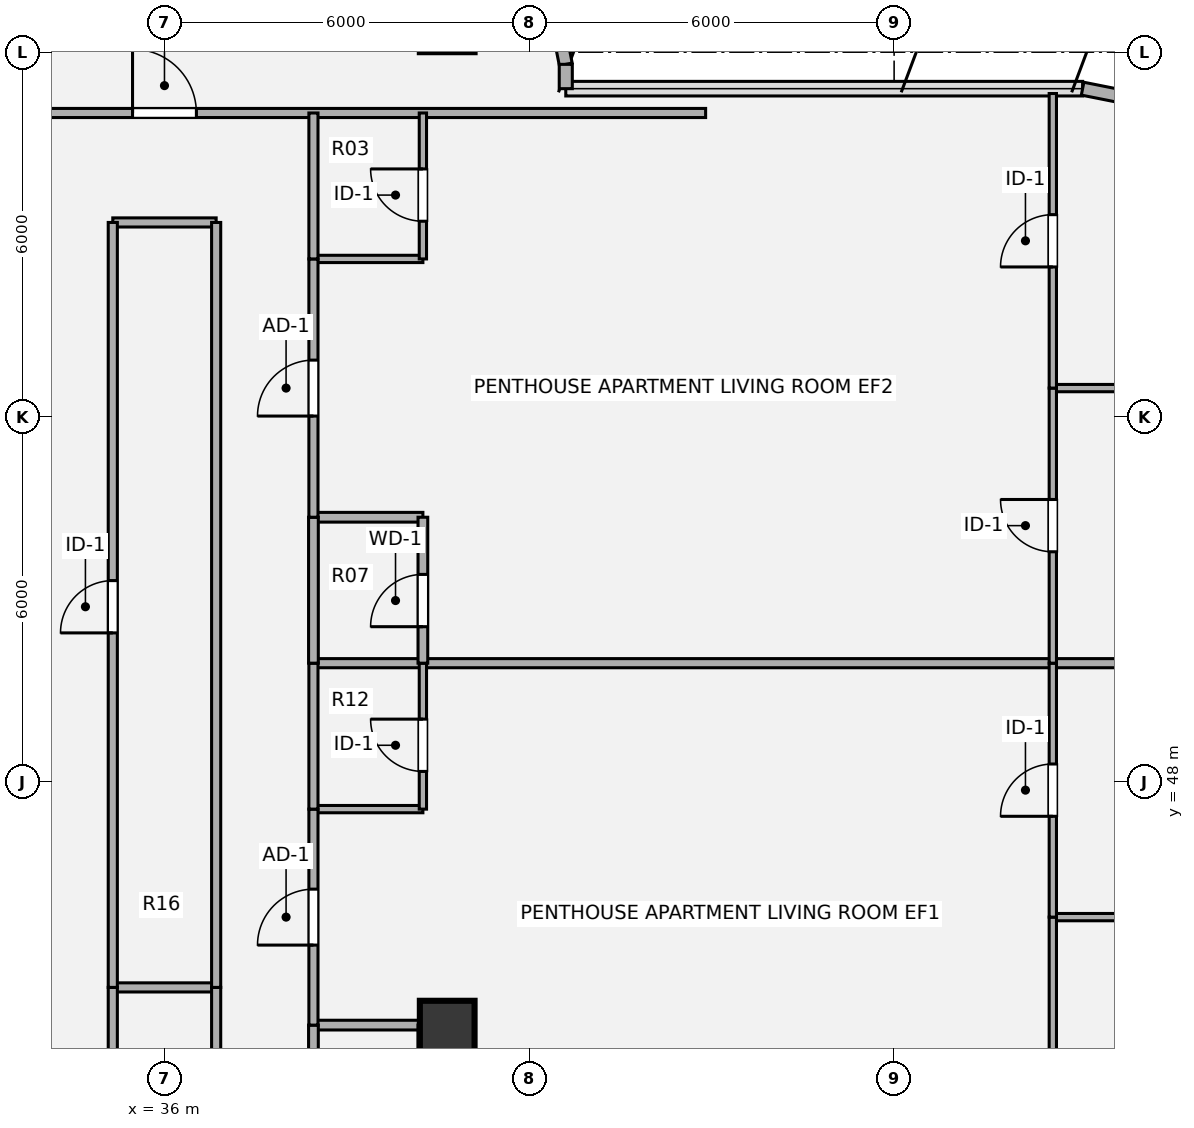
"""IFC4 building model, lengths in metres.
Left out: names, types, materials, properties, quantities, classifications, styles, units other than length and angle.
Written with IfcOpenShell. Run it as: python <this file> out.ifc"""

import sys

from ifc_helpers import new_model, si_unit, direction, frame, frame_2d, origin, origin_2d, place, context, subcontext, project, spatial, rectangle, hollow_circle, extrude, source, transform, mapped, element, fill, save


model = new_model("IFC4")
c1 = context("Model", 3, precision=1e-05, world=origin(), true_north=direction((0.0, 1.0)))
c2 = subcontext(c1, "Body", "Model", "MODEL_VIEW")
j1 = project(units=[si_unit("LENGTHUNIT", "METRE"), si_unit("PLANEANGLEUNIT", "RADIAN")], contexts=[c1])
p1 = place(None, origin())
s1 = spatial("IfcSite", under=j1, at=p1, CompositionType="ELEMENT")
p2 = place(p1, origin())
s2 = spatial("IfcBuilding", under=s1, at=p2, CompositionType="ELEMENT")
p3 = place(p2, frame((0.0, 0.0, 223.02)))
s3 = spatial("IfcBuildingStorey", under=s2, at=p3, CompositionType="ELEMENT", Elevation=223.02)
m1 = source(origin(), c2, "Body", "SweptSolid", [
    extrude(hollow_circle(Radius=0.45, WallThickness=0.032, at=origin_2d()), origin(), (0.0, 0.0, 1.0), 3.78),
])
p4 = place(p3, frame((40.65, 43.95, 0.0), z_axis=(0.0, 0.0, 1.0), x_axis=(1.0, 0.0, 0.0)))
e1 = element("IfcColumn", 1, at=p4, inside=s3, PredefinedType="COLUMN", context=c2, shape_type="MappedRepresentation", body=[
    mapped(m1, transform((0.0, 0.0, 0.0), x_axis=(1.0, 0.0, 0.0), y_axis=(0.0, 1.0, 0.0), z_axis=(0.0, 0.0, 1.0), scale=1.0)),
])
p5 = place(p3, frame((42.402, 60.795, 0.0), z_axis=(0.0, 0.0, 1.0), x_axis=(0.195190360752, -0.980765376158, 0.0)))
e2 = element("IfcWall", 2, at=p5, inside=s3, PredefinedType="SOLIDWALL", context=c2, shape_type="SweptSolid", body=[
    extrude(rectangle(XDim=1.014, YDim=0.215, at=frame_2d((0.507, 0.0))), origin(), (0.0, 0.0, 1.0), 3.53),
])
p6 = place(p3, frame((42.6, 59.8, 0.0), z_axis=(0.0, 0.0, 1.0), x_axis=(0.0, -1.0, 0.0)))
e3 = element("IfcWall", 3, at=p6, inside=s3, PredefinedType="SOLIDWALL", context=c2, shape_type="SweptSolid", body=[
    extrude(rectangle(XDim=0.4, YDim=0.215, at=frame_2d((0.2, 0.0))), origin(), (0.0, 0.0, 1.0), 3.53),
])
p7 = place(p3, frame((51.1, 59.4, 0.0), z_axis=(0.0, 0.0, 1.0), x_axis=(0.980813122964, -0.194950295773, 0.0)))
e4 = element("IfcWall", 4, at=p7, inside=s3, PredefinedType="SOLIDWALL", context=c2, shape_type="SweptSolid", body=[
    extrude(rectangle(XDim=1.249, YDim=0.215, at=frame_2d((0.624, 0.0))), origin(), (0.0, 0.0, 1.0), 3.53),
])
p8 = place(p3, frame((38.45, 44.0, 0.0), z_axis=(0.0, 0.0, 1.0), x_axis=(1.0, 0.0, 0.0)))
e5 = element("IfcWall", 5, at=p8, inside=s3, PredefinedType="PLUMBINGWALL", context=c2, shape_type="SweptSolid", body=[
    extrude(rectangle(XDim=1.8, YDim=0.16, at=frame_2d((0.9, 0.0))), origin(), (0.0, 0.0, 1.0), 2.903),
])
p9 = place(p3, frame((35.15, 44.62, 0.0), z_axis=(0.0, 0.0, 1.0), x_axis=(1.0, 0.0, 0.0)))
e6 = element("IfcWall", 6, at=p9, inside=s3, PredefinedType="PARTITIONING", context=c2, shape_type="SweptSolid", body=[
    extrude(rectangle(XDim=1.7, YDim=0.15, at=frame_2d((0.85, 0.0))), origin(), (0.0, 0.0, 1.0), 3.259),
])
p10 = place(p3, frame((50.61, 45.776, 0.0), z_axis=(0.0, 0.0, 1.0), x_axis=(1.0, 0.0, 0.0)))
e7 = element("IfcWall", 7, at=p10, inside=s3, PredefinedType="PARTITIONING", context=c2, shape_type="SweptSolid", body=[
    extrude(rectangle(XDim=3.61, YDim=0.12, at=frame_2d((1.805, 0.0))), origin(), (0.0, 0.0, 1.0), 2.982),
])
p11 = place(p3, frame((38.45, 47.552, 0.0), z_axis=(0.0, 0.0, 1.0), x_axis=(1.0, 0.0, 0.0)))
e8 = element("IfcWall", 8, at=p11, inside=s3, PredefinedType="PARTITIONING", context=c2, shape_type="SweptSolid", body=[
    extrude(rectangle(XDim=1.8, YDim=0.12, at=frame_2d((0.9, 0.0))), origin(), (0.0, 0.0, 1.0), 3.259),
])
p12 = place(p3, frame((38.45, 49.952, 0.0), z_axis=(0.0, 0.0, 1.0), x_axis=(1.0, 0.0, 0.0)))
e9 = element("IfcWall", 9, at=p12, inside=s3, PredefinedType="PARTITIONING", context=c2, shape_type="SweptSolid", body=[
    extrude(rectangle(XDim=15.77, YDim=0.15, at=frame_2d((7.885, 0.0))), origin(), (0.0, 0.0, 1.0), 2.982),
])
p13 = place(p3, frame((38.45, 52.352, 0.0), z_axis=(0.0, 0.0, 1.0), x_axis=(1.0, 0.0, 0.0)))
e10 = element("IfcWall", 10, at=p13, inside=s3, PredefinedType="PLUMBINGWALL", context=c2, shape_type="SweptSolid", body=[
    extrude(rectangle(XDim=1.8, YDim=0.16, at=frame_2d((0.9, 0.0))), origin(), (0.0, 0.0, 1.0), 3.259),
])
p14 = place(p3, frame((50.61, 54.476, 0.0), z_axis=(0.0, 0.0, 1.0), x_axis=(1.0, 0.0, 0.0)))
e11 = element("IfcWall", 11, at=p14, inside=s3, PredefinedType="PARTITIONING", context=c2, shape_type="SweptSolid", body=[
    extrude(rectangle(XDim=3.61, YDim=0.12, at=frame_2d((1.805, 0.0))), origin(), (0.0, 0.0, 1.0), 2.903),
])
p15 = place(p3, frame((38.45, 56.6, 0.0), z_axis=(0.0, 0.0, 1.0), x_axis=(1.0, 0.0, 0.0)))
e12 = element("IfcWall", 12, at=p15, inside=s3, PredefinedType="PARTITIONING", context=c2, shape_type="SweptSolid", body=[
    extrude(rectangle(XDim=1.8, YDim=0.12, at=frame_2d((0.9, 0.0))), origin(), (0.0, 0.0, 1.0), 3.259),
])
p16 = place(p3, frame((35.15, 57.2, 0.0), z_axis=(0.0, 0.0, 1.0), x_axis=(1.0, 0.0, 0.0)))
e13 = element("IfcWall", 13, at=p16, inside=s3, PredefinedType="PARTITIONING", context=c2, shape_type="SweptSolid", body=[
    extrude(rectangle(XDim=1.7, YDim=0.15, at=frame_2d((0.85, 0.0))), origin(), (0.0, 0.0, 1.0), 3.308),
])
p17 = place(p3, frame((27.1, 59.0, 0.0), z_axis=(0.0, 0.0, 1.0), x_axis=(1.0, 0.0, 0.0)))
e14 = element("IfcWall", 14, at=p17, inside=s3, PredefinedType="PARTITIONING", context=c2, shape_type="SweptSolid", body=[
    extrude(rectangle(XDim=17.8, YDim=0.15, at=frame_2d((8.9, 0.0))), origin(), (0.0, 0.0, 1.0), 3.308),
])
p18 = place(p17, frame((8.375, 0.0, 0.0)))
e15 = element("IfcOpeningElement", 15, at=p18, cuts=e14, PredefinedType="OPENING", context=c2, shape_type="SweptSolid", body=[
    extrude(rectangle(XDim=1.05, YDim=2.1, at=origin_2d()), frame((0.525, 0.085, 1.05), z_axis=(0.0, -1.0, 0.0), x_axis=(1.0, 0.0, 0.0)), (0.0, 0.0, 1.0), 0.17),
])
p19 = place(p3, frame((35.15, 25.2, 0.0), z_axis=(0.0, 0.0, 1.0), x_axis=(0.0, 1.0, 0.0)))
e16 = element("IfcWall", 16, at=p19, inside=s3, PredefinedType="PARTITIONING", context=c2, shape_type="SweptSolid", body=[
    extrude(rectangle(XDim=19.42, YDim=0.15, at=frame_2d((9.71, 0.0))), origin(), (0.0, 0.0, 1.0), 3.5),
])
p20 = place(p3, frame((35.15, 44.62, 0.0), z_axis=(0.0, 0.0, 1.0), x_axis=(0.0, 1.0, 0.0)))
e17 = element("IfcWall", 17, at=p20, inside=s3, PredefinedType="PARTITIONING", context=c2, shape_type="SweptSolid", body=[
    extrude(rectangle(XDim=12.58, YDim=0.15, at=frame_2d((6.29, 0.0))), origin(), (0.0, 0.0, 1.0), 3.5),
])
p21 = place(p20, frame((5.83, 0.0, 0.0)))
e18 = element("IfcOpeningElement", 18, at=p21, cuts=e17, PredefinedType="OPENING", context=c2, shape_type="SweptSolid", body=[
    extrude(rectangle(XDim=0.86, YDim=2.1, at=origin_2d()), frame((0.43, 0.085, 1.05), z_axis=(0.0, -1.0, 0.0), x_axis=(1.0, 0.0, 0.0)), (0.0, 0.0, 1.0), 0.17),
])
p22 = place(p3, frame((36.85, 25.2, 0.0), z_axis=(0.0, 0.0, 1.0), x_axis=(0.0, 1.0, 0.0)))
e19 = element("IfcWall", 19, at=p22, inside=s3, PredefinedType="PARTITIONING", context=c2, shape_type="SweptSolid", body=[
    extrude(rectangle(XDim=19.42, YDim=0.15, at=frame_2d((9.71, 0.0))), origin(), (0.0, 0.0, 1.0), 3.5),
])
p23 = place(p22, frame((9.185, 0.0, 0.0)))
e20 = element("IfcOpeningElement", 20, at=p23, cuts=e19, PredefinedType="OPENING", context=c2, shape_type="SweptSolid", body=[
    extrude(rectangle(XDim=1.05, YDim=2.1, at=origin_2d()), frame((0.525, 0.085, 1.05), z_axis=(0.0, -1.0, 0.0), x_axis=(1.0, 0.0, 0.0)), (0.0, 0.0, 1.0), 0.17),
])
p24 = place(p3, frame((36.85, 44.62, 0.0), z_axis=(0.0, 0.0, 1.0), x_axis=(0.0, 1.0, 0.0)))
e21 = element("IfcWall", 21, at=p24, inside=s3, PredefinedType="PARTITIONING", context=c2, shape_type="SweptSolid", body=[
    extrude(rectangle(XDim=12.58, YDim=0.15, at=frame_2d((6.29, 0.0))), origin(), (0.0, 0.0, 1.0), 3.5),
])
p25 = place(p3, frame((38.45, 41.6, 0.0), z_axis=(0.0, 0.0, 1.0), x_axis=(0.0, 1.0, 0.0)))
e22 = element("IfcWall", 22, at=p25, inside=s3, PredefinedType="PLUMBINGWALL", context=c2, shape_type="SweptSolid", body=[
    extrude(rectangle(XDim=2.4, YDim=0.16, at=frame_2d((1.2, 0.0))), origin(), (0.0, 0.0, 1.0), 3.5),
])
p26 = place(p3, frame((38.45, 44.0, 0.0), z_axis=(0.0, 0.0, 1.0), x_axis=(0.0, 1.0, 0.0)))
e23 = element("IfcWall", 23, at=p26, inside=s3, PredefinedType="PARTITIONING", context=c2, shape_type="SweptSolid", body=[
    extrude(rectangle(XDim=3.552, YDim=0.15, at=frame_2d((1.776, 0.0))), origin(), (0.0, 0.0, 1.0), 3.5),
])
p27 = place(p26, frame((1.316, 0.0, 0.0)))
e24 = element("IfcOpeningElement", 24, at=p27, cuts=e23, PredefinedType="OPENING", context=c2, shape_type="SweptSolid", body=[
    extrude(rectangle(XDim=0.92, YDim=2.1, at=origin_2d()), frame((0.46, 0.085, 1.05), z_axis=(0.0, -1.0, 0.0), x_axis=(1.0, 0.0, 0.0)), (0.0, 0.0, 1.0), 0.17),
])
p28 = place(p3, frame((38.45, 47.552, 0.0), z_axis=(0.0, 0.0, 1.0), x_axis=(0.0, 1.0, 0.0)))
e25 = element("IfcWall", 25, at=p28, inside=s3, PredefinedType="PARTITIONING", context=c2, shape_type="SweptSolid", body=[
    extrude(rectangle(XDim=2.4, YDim=0.15, at=frame_2d((1.2, 0.0))), origin(), (0.0, 0.0, 1.0), 3.5),
])
p29 = place(p3, frame((38.45, 49.952, 0.0), z_axis=(0.0, 0.0, 1.0), x_axis=(0.0, 1.0, 0.0)))
e26 = element("IfcWall", 26, at=p29, inside=s3, PredefinedType="PLUMBINGWALL", context=c2, shape_type="SweptSolid", body=[
    extrude(rectangle(XDim=2.4, YDim=0.16, at=frame_2d((1.2, 0.0))), origin(), (0.0, 0.0, 1.0), 3.5),
])
p30 = place(p3, frame((38.45, 52.352, 0.0), z_axis=(0.0, 0.0, 1.0), x_axis=(0.0, 1.0, 0.0)))
e27 = element("IfcWall", 27, at=p30, inside=s3, PredefinedType="PARTITIONING", context=c2, shape_type="SweptSolid", body=[
    extrude(rectangle(XDim=4.248, YDim=0.15, at=frame_2d((2.124, 0.0))), origin(), (0.0, 0.0, 1.0), 3.5),
])
p31 = place(p30, frame((1.664, 0.0, 0.0)))
e28 = element("IfcOpeningElement", 28, at=p31, cuts=e27, PredefinedType="OPENING", context=c2, shape_type="SweptSolid", body=[
    extrude(rectangle(XDim=0.92, YDim=2.1, at=origin_2d()), frame((0.46, 0.085, 1.05), z_axis=(0.0, -1.0, 0.0), x_axis=(1.0, 0.0, 0.0)), (0.0, 0.0, 1.0), 0.17),
])
p32 = place(p3, frame((38.45, 56.6, 0.0), z_axis=(0.0, 0.0, 1.0), x_axis=(0.0, 1.0, 0.0)))
e29 = element("IfcWall", 29, at=p32, inside=s3, PredefinedType="PARTITIONING", context=c2, shape_type="SweptSolid", body=[
    extrude(rectangle(XDim=2.4, YDim=0.15, at=frame_2d((1.2, 0.0))), origin(), (0.0, 0.0, 1.0), 3.5),
])
p33 = place(p3, frame((40.25, 41.6, 0.0), z_axis=(0.0, 0.0, 1.0), x_axis=(0.0, 1.0, 0.0)))
e30 = element("IfcWall", 30, at=p33, inside=s3, PredefinedType="PLUMBINGWALL", context=c2, shape_type="SweptSolid", body=[
    extrude(rectangle(XDim=2.4, YDim=0.16, at=frame_2d((1.2, 0.0))), origin(), (0.0, 0.0, 1.0), 3.5),
])
p34 = place(p33, frame((0.6, 0.0, 0.0)))
e31 = element("IfcOpeningElement", 31, at=p34, cuts=e30, PredefinedType="OPENING", context=c2, shape_type="SweptSolid", body=[
    extrude(rectangle(XDim=0.86, YDim=2.1, at=origin_2d()), frame((0.43, 0.09, 1.05), z_axis=(0.0, -1.0, 0.0), x_axis=(1.0, 0.0, 0.0)), (0.0, 0.0, 1.0), 0.18),
])
p35 = place(p3, frame((40.25, 47.552, 0.0), z_axis=(0.0, 0.0, 1.0), x_axis=(0.0, 1.0, 0.0)))
e32 = element("IfcWall", 32, at=p35, inside=s3, PredefinedType="PARTITIONING", context=c2, shape_type="SweptSolid", body=[
    extrude(rectangle(XDim=2.4, YDim=0.12, at=frame_2d((1.2, 0.0))), origin(), (0.0, 0.0, 1.0), 3.5),
])
p36 = place(p35, frame((0.62, 0.0, 0.0)))
e33 = element("IfcOpeningElement", 33, at=p36, cuts=e32, PredefinedType="OPENING", context=c2, shape_type="SweptSolid", body=[
    extrude(rectangle(XDim=0.86, YDim=2.1, at=origin_2d()), frame((0.43, 0.07, 1.05), z_axis=(0.0, -1.0, 0.0), x_axis=(1.0, 0.0, 0.0)), (0.0, 0.0, 1.0), 0.14),
])
p37 = place(p3, frame((40.25, 49.952, 0.0), z_axis=(0.0, 0.0, 1.0), x_axis=(0.0, 1.0, 0.0)))
e34 = element("IfcWall", 34, at=p37, inside=s3, PredefinedType="PLUMBINGWALL", context=c2, shape_type="SweptSolid", body=[
    extrude(rectangle(XDim=2.4, YDim=0.16, at=frame_2d((1.2, 0.0))), origin(), (0.0, 0.0, 1.0), 3.5),
])
p38 = place(p37, frame((0.6, 0.0, 0.0)))
e35 = element("IfcOpeningElement", 35, at=p38, cuts=e34, PredefinedType="OPENING", context=c2, shape_type="SweptSolid", body=[
    extrude(rectangle(XDim=0.86, YDim=2.1, at=origin_2d()), frame((0.43, 0.09, 1.05), z_axis=(0.0, -1.0, 0.0), x_axis=(1.0, 0.0, 0.0)), (0.0, 0.0, 1.0), 0.18),
])
p39 = place(p3, frame((40.25, 56.6, 0.0), z_axis=(0.0, 0.0, 1.0), x_axis=(0.0, 1.0, 0.0)))
e36 = element("IfcWall", 36, at=p39, inside=s3, PredefinedType="PARTITIONING", context=c2, shape_type="SweptSolid", body=[
    extrude(rectangle(XDim=2.4, YDim=0.12, at=frame_2d((1.2, 0.0))), origin(), (0.0, 0.0, 1.0), 3.5),
])
p40 = place(p39, frame((0.62, 0.0, 0.0)))
e37 = element("IfcOpeningElement", 37, at=p40, cuts=e36, PredefinedType="OPENING", context=c2, shape_type="SweptSolid", body=[
    extrude(rectangle(XDim=0.86, YDim=2.1, at=origin_2d()), frame((0.43, 0.07, 1.05), z_axis=(0.0, -1.0, 0.0), x_axis=(1.0, 0.0, 0.0)), (0.0, 0.0, 1.0), 0.14),
])
p41 = place(p3, frame((50.61, 41.48, 0.0), z_axis=(0.0, 0.0, 1.0), x_axis=(0.0, 1.0, 0.0)))
e38 = element("IfcWall", 38, at=p41, inside=s3, PredefinedType="PARTITIONING", context=c2, shape_type="SweptSolid", body=[
    extrude(rectangle(XDim=4.296, YDim=0.12, at=frame_2d((2.148, 0.0))), origin(), (0.0, 0.0, 1.0), 3.5),
])
p42 = place(p41, frame((0.198, 0.0, 0.0)))
e39 = element("IfcOpeningElement", 39, at=p42, cuts=e38, PredefinedType="OPENING", context=c2, shape_type="SweptSolid", body=[
    extrude(rectangle(XDim=0.86, YDim=2.1, at=origin_2d()), frame((0.43, 0.07, 1.05), z_axis=(0.0, -1.0, 0.0), x_axis=(1.0, 0.0, 0.0)), (0.0, 0.0, 1.0), 0.14),
])
p43 = place(p3, frame((50.61, 45.776, 0.0), z_axis=(0.0, 0.0, 1.0), x_axis=(0.0, 1.0, 0.0)))
e40 = element("IfcWall", 40, at=p43, inside=s3, PredefinedType="PARTITIONING", context=c2, shape_type="SweptSolid", body=[
    extrude(rectangle(XDim=4.176, YDim=0.12, at=frame_2d((2.088, 0.0))), origin(), (0.0, 0.0, 1.0), 3.5),
])
p44 = place(p43, frame((1.658, 0.0, 0.0)))
e41 = element("IfcOpeningElement", 41, at=p44, cuts=e40, PredefinedType="OPENING", context=c2, shape_type="SweptSolid", body=[
    extrude(rectangle(XDim=0.86, YDim=2.1, at=origin_2d()), frame((0.43, 0.07, 1.05), z_axis=(0.0, -1.0, 0.0), x_axis=(1.0, 0.0, 0.0)), (0.0, 0.0, 1.0), 0.14),
])
p45 = place(p3, frame((50.61, 49.952, 0.0), z_axis=(0.0, 0.0, 1.0), x_axis=(0.0, 1.0, 0.0)))
e42 = element("IfcWall", 42, at=p45, inside=s3, PredefinedType="PARTITIONING", context=c2, shape_type="SweptSolid", body=[
    extrude(rectangle(XDim=4.524, YDim=0.12, at=frame_2d((2.262, 0.0))), origin(), (0.0, 0.0, 1.0), 3.5),
])
p46 = place(p45, frame((1.832, 0.0, 0.0)))
e43 = element("IfcOpeningElement", 43, at=p46, cuts=e42, PredefinedType="OPENING", context=c2, shape_type="SweptSolid", body=[
    extrude(rectangle(XDim=0.86, YDim=2.1, at=origin_2d()), frame((0.43, 0.07, 1.05), z_axis=(0.0, -1.0, 0.0), x_axis=(1.0, 0.0, 0.0)), (0.0, 0.0, 1.0), 0.14),
])
p47 = place(p3, frame((50.61, 54.476, 0.0), z_axis=(0.0, 0.0, 1.0), x_axis=(0.0, 1.0, 0.0)))
e44 = element("IfcWall", 44, at=p47, inside=s3, PredefinedType="PARTITIONING", context=c2, shape_type="SweptSolid", body=[
    extrude(rectangle(XDim=4.844, YDim=0.12, at=frame_2d((2.422, 0.0))), origin(), (0.0, 0.0, 1.0), 3.5),
])
p48 = place(p47, frame((1.992, 0.0, 0.0)))
e45 = element("IfcOpeningElement", 45, at=p48, cuts=e44, PredefinedType="OPENING", context=c2, shape_type="SweptSolid", body=[
    extrude(rectangle(XDim=0.86, YDim=2.1, at=origin_2d()), frame((0.43, 0.07, 1.05), z_axis=(0.0, -1.0, 0.0), x_axis=(1.0, 0.0, 0.0)), (0.0, 0.0, 1.0), 0.14),
])
m2 = source(origin(), c2, "Body", "SweptSolid", [
    extrude(rectangle(XDim=1.05, YDim=2.1, at=origin_2d()), frame((0.525, 0.025, 1.05), z_axis=(0.0, -1.0, 0.0), x_axis=(1.0, 0.0, 0.0)), (0.0, 0.0, 1.0), 0.05),
])
p49 = place(p18, origin())
e46 = element("IfcDoor", 46, at=p49, inside=s3, OperationType="SINGLE_SWING_LEFT", PredefinedType="DOOR", context=c2, shape_type="MappedRepresentation", body=[
    mapped(m2, transform((0.0, 0.0, 0.0), x_axis=(1.0, 0.0, 0.0), y_axis=(0.0, 1.0, 0.0), z_axis=(0.0, 0.0, 1.0), scale=1.0)),
])
fill(e15, e46)
m3 = source(origin(), c2, "Body", "SweptSolid", [
    extrude(rectangle(XDim=0.86, YDim=2.1, at=origin_2d()), frame((0.43, 0.025, 1.05), z_axis=(0.0, -1.0, 0.0), x_axis=(1.0, 0.0, 0.0)), (0.0, 0.0, 1.0), 0.05),
])
p50 = place(p21, origin())
e47 = element("IfcDoor", 47, at=p50, inside=s3, OperationType="SINGLE_SWING_LEFT", PredefinedType="DOOR", context=c2, shape_type="MappedRepresentation", body=[
    mapped(m3, transform((0.0, 0.0, 0.0), x_axis=(1.0, 0.0, 0.0), y_axis=(0.0, 1.0, 0.0), z_axis=(0.0, 0.0, 1.0), scale=1.0)),
])
fill(e18, e47)
m4 = source(origin(), c2, "Body", "SweptSolid", [
    extrude(rectangle(XDim=0.92, YDim=2.1, at=origin_2d()), frame((0.46, 0.025, 1.05), z_axis=(0.0, -1.0, 0.0), x_axis=(1.0, 0.0, 0.0)), (0.0, 0.0, 1.0), 0.05),
])
p51 = place(p27, origin())
e48 = element("IfcDoor", 48, at=p51, inside=s3, OperationType="SINGLE_SWING_LEFT", PredefinedType="DOOR", context=c2, shape_type="MappedRepresentation", body=[
    mapped(m4, transform((0.0, 0.0, 0.0), x_axis=(1.0, 0.0, 0.0), y_axis=(0.0, 1.0, 0.0), z_axis=(0.0, 0.0, 1.0), scale=1.0)),
])
fill(e24, e48)
p52 = place(p31, origin())
e49 = element("IfcDoor", 49, at=p52, inside=s3, OperationType="SINGLE_SWING_LEFT", PredefinedType="DOOR", context=c2, shape_type="MappedRepresentation", body=[
    mapped(m4, transform((0.0, 0.0, 0.0), x_axis=(1.0, 0.0, 0.0), y_axis=(0.0, 1.0, 0.0), z_axis=(0.0, 0.0, 1.0), scale=1.0)),
])
fill(e28, e49)
p53 = place(p36, origin())
e50 = element("IfcDoor", 50, at=p53, inside=s3, OperationType="SINGLE_SWING_RIGHT", PredefinedType="DOOR", context=c2, shape_type="MappedRepresentation", body=[
    mapped(m3, transform((0.0, 0.0, 0.0), x_axis=(1.0, 0.0, 0.0), y_axis=(0.0, 1.0, 0.0), z_axis=(0.0, 0.0, 1.0), scale=1.0)),
])
fill(e33, e50)
m5 = source(origin(), c2, "Body", "SweptSolid", [
    extrude(rectangle(XDim=0.86, YDim=2.1, at=origin_2d()), frame((0.43, 0.025, 1.05), z_axis=(0.0, -1.0, 0.0), x_axis=(1.0, 0.0, 0.0)), (0.0, 0.0, 1.0), 0.05),
])
p54 = place(p38, origin())
e51 = element("IfcDoor", 51, at=p54, inside=s3, OperationType="SINGLE_SWING_LEFT", PredefinedType="DOOR", context=c2, shape_type="MappedRepresentation", body=[
    mapped(m5, transform((0.0, 0.0, 0.0), x_axis=(1.0, 0.0, 0.0), y_axis=(0.0, 1.0, 0.0), z_axis=(0.0, 0.0, 1.0), scale=1.0)),
])
fill(e35, e51)
p55 = place(p40, origin())
e52 = element("IfcDoor", 52, at=p55, inside=s3, OperationType="SINGLE_SWING_RIGHT", PredefinedType="DOOR", context=c2, shape_type="MappedRepresentation", body=[
    mapped(m3, transform((0.0, 0.0, 0.0), x_axis=(1.0, 0.0, 0.0), y_axis=(0.0, 1.0, 0.0), z_axis=(0.0, 0.0, 1.0), scale=1.0)),
])
fill(e37, e52)
p56 = place(p44, origin())
e53 = element("IfcDoor", 53, at=p56, inside=s3, OperationType="SINGLE_SWING_LEFT", PredefinedType="DOOR", context=c2, shape_type="MappedRepresentation", body=[
    mapped(m3, transform((0.0, 0.0, 0.0), x_axis=(1.0, 0.0, 0.0), y_axis=(0.0, 1.0, 0.0), z_axis=(0.0, 0.0, 1.0), scale=1.0)),
])
fill(e41, e53)
p57 = place(p46, origin())
e54 = element("IfcDoor", 54, at=p57, inside=s3, OperationType="SINGLE_SWING_RIGHT", PredefinedType="DOOR", context=c2, shape_type="MappedRepresentation", body=[
    mapped(m3, transform((0.0, 0.0, 0.0), x_axis=(1.0, 0.0, 0.0), y_axis=(0.0, 1.0, 0.0), z_axis=(0.0, 0.0, 1.0), scale=1.0)),
])
fill(e43, e54)
p58 = place(p48, origin())
e55 = element("IfcDoor", 55, at=p58, inside=s3, OperationType="SINGLE_SWING_LEFT", PredefinedType="DOOR", context=c2, shape_type="MappedRepresentation", body=[
    mapped(m3, transform((0.0, 0.0, 0.0), x_axis=(1.0, 0.0, 0.0), y_axis=(0.0, 1.0, 0.0), z_axis=(0.0, 0.0, 1.0), scale=1.0)),
])
fill(e45, e55)
save(model, sys.argv[1])
